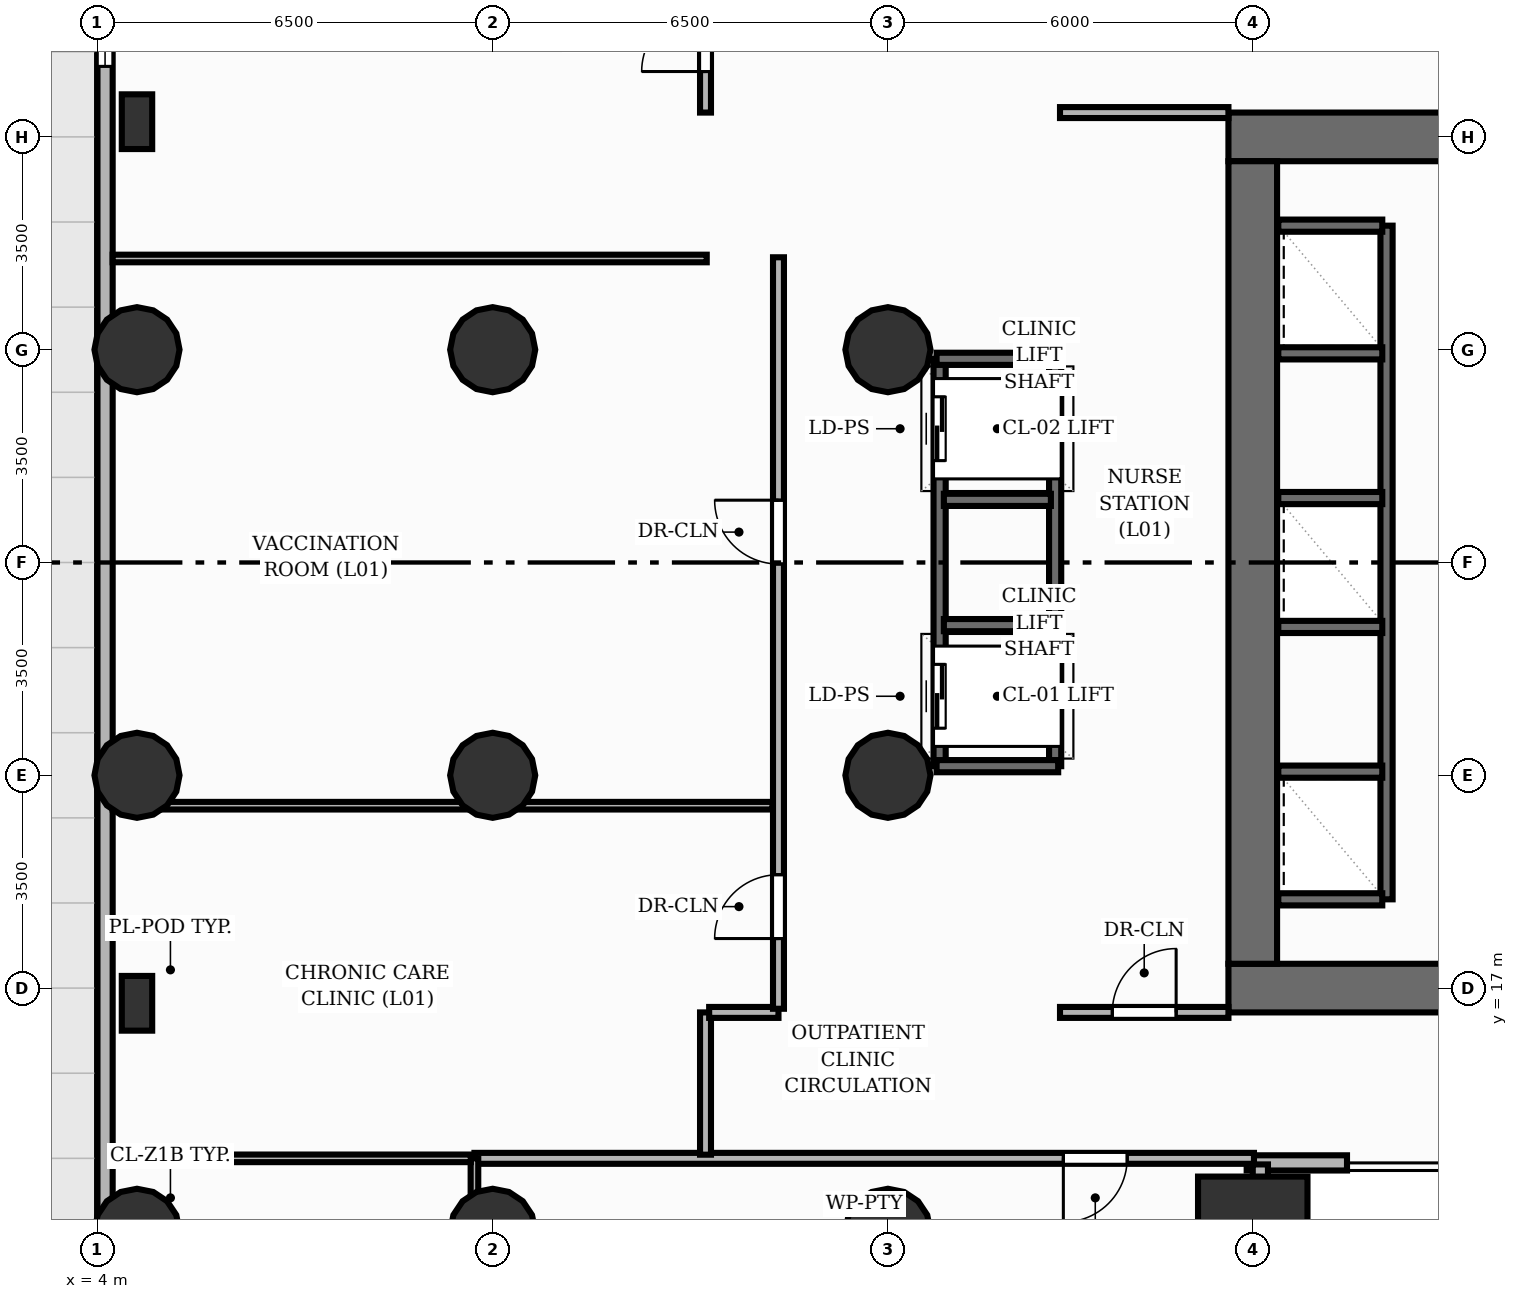
"""IFC4 building model, lengths in metres.
Left out: names, types, materials, properties, quantities, classifications, styles, units other than length and angle.
Written with IfcOpenShell. Run it as: python <this file> out.ifc"""

import sys

from ifc_helpers import new_model, si_unit, direction, frame, frame_2d, origin, origin_2d, place, context, subcontext, project, spatial, rectangle, circle, extrude, element, fill, save


model = new_model("IFC4")
c1 = context("Model", 3, precision=1e-05, world=origin(), true_north=direction((0.0, 1.0)))
c2 = subcontext(c1, "Body", "Model", "MODEL_VIEW")
j1 = project(units=[si_unit("LENGTHUNIT", "METRE"), si_unit("PLANEANGLEUNIT", "RADIAN")], contexts=[c1])
p1 = place(None, origin())
s1 = spatial("IfcSite", under=j1, at=p1, CompositionType="ELEMENT")
p2 = place(p1, origin())
s2 = spatial("IfcBuilding", under=s1, at=p2, CompositionType="ELEMENT")
p3 = place(p2, frame((0.0, 0.0, 4.0)))
s3 = spatial("IfcBuildingStorey", under=s2, at=p3, CompositionType="ELEMENT", Elevation=4.0)
p4 = place(p3, frame((22.6, 17.0, 0.0), z_axis=(0.0, 0.0, 1.0), x_axis=(1.0, 0.0, 0.0)))
e1 = element("IfcWall", 1, at=p4, inside=s3, PredefinedType="SHEAR", context=c2, shape_type="SweptSolid", body=[
    extrude(rectangle(XDim=18.8, YDim=0.8, at=frame_2d((9.4, 0.0))), origin(), (0.0, 0.0, 1.0), 4.0),
])
p5 = place(p4, frame((5.9, 0.0, 0.0)))
e2 = element("IfcOpeningElement", 2, at=p5, cuts=e1, PredefinedType="OPENING", context=c2, shape_type="SweptSolid", body=[
    extrude(rectangle(XDim=1.1, YDim=2.15, at=frame_2d((0.55, 1.075))), frame((0.0, 0.41, 0.0), z_axis=(0.0, -1.0, 0.0), x_axis=(1.0, 0.0, 0.0)), (0.0, 0.0, 1.0), 0.82),
])
p6 = place(p4, frame((9.45, 0.0, 0.0)))
e3 = element("IfcOpeningElement", 3, at=p6, cuts=e1, PredefinedType="OPENING", context=c2, shape_type="SweptSolid", body=[
    extrude(rectangle(XDim=0.9, YDim=2.1, at=frame_2d((0.45, 1.05))), frame((0.0, 0.41, 0.0), z_axis=(0.0, -1.0, 0.0), x_axis=(1.0, 0.0, 0.0)), (0.0, 0.0, 1.0), 0.82),
])
p7 = place(p3, frame((22.6, 31.0, 0.0), z_axis=(0.0, 0.0, 1.0), x_axis=(1.0, 0.0, 0.0)))
e4 = element("IfcWall", 4, at=p7, inside=s3, PredefinedType="SHEAR", context=c2, shape_type="SweptSolid", body=[
    extrude(rectangle(XDim=18.8, YDim=0.8, at=frame_2d((9.4, 0.0))), origin(), (0.0, 0.0, 1.0), 4.0),
])
p8 = place(p7, frame((11.8, 0.0, 0.0)))
e5 = element("IfcOpeningElement", 5, at=p8, cuts=e4, PredefinedType="OPENING", context=c2, shape_type="SweptSolid", body=[
    extrude(rectangle(XDim=1.1, YDim=2.15, at=frame_2d((0.55, 1.075))), frame((0.0, 0.41, 0.0), z_axis=(0.0, -1.0, 0.0), x_axis=(1.0, 0.0, 0.0)), (0.0, 0.0, 1.0), 0.82),
])
p9 = place(p3, frame((23.0, 17.4, 0.0), z_axis=(0.0, 0.0, 1.0), x_axis=(0.0, 1.0, 0.0)))
e6 = element("IfcWall", 6, at=p9, inside=s3, PredefinedType="SHEAR", context=c2, shape_type="SweptSolid", body=[
    extrude(rectangle(XDim=13.2, YDim=0.8, at=frame_2d((6.6, 0.0))), origin(), (0.0, 0.0, 1.0), 4.0),
])
for number, where, z_axis, x_axis in (
    (7, (4.65, 13.0, 0.0), (0.0, 0.0, 1.0), (1.0, 0.0, 0.0)),
    (8, (4.65, 20.5, 0.0), (0.0, 0.0, 1.0), (1.0, 0.0, 0.0)),
    (9, (4.65, 27.5, 0.0), (0.0, 0.0, 1.0), (1.0, 0.0, 0.0)),
    (10, (10.5, 13.0, 0.0), (0.0, 0.0, 1.0), (1.0, 0.0, 0.0)),
    (11, (10.5, 20.5, 0.0), (0.0, 0.0, 1.0), (1.0, 0.0, 0.0)),
    (12, (10.5, 27.5, 0.0), (0.0, 0.0, 1.0), (1.0, 0.0, 0.0)),
    (13, (17.0, 13.0, 0.0), (0.0, 0.0, 1.0), (1.0, 0.0, 0.0)),
    (14, (17.0, 20.5, 0.0), (0.0, 0.0, 1.0), (1.0, 0.0, 0.0)),
    (15, (17.0, 27.5, 0.0), (0.0, 0.0, 1.0), (1.0, 0.0, 0.0)),
):
    element("IfcColumn", number, at=place(p3, frame(where, z_axis=z_axis, x_axis=x_axis)), inside=s3, PredefinedType="COLUMN", context=c2, shape_type="SweptSolid", body=[
        extrude(circle(Radius=0.7, at=origin_2d()), origin(), (0.0, 0.0, 1.0), 4.0),
    ])
p10 = place(p3, frame((23.0, 13.0, 0.0), z_axis=(0.0, 0.0, 1.0), x_axis=(1.0, 0.0, 0.0)))
e16 = element("IfcColumn", 16, at=p10, inside=s3, PredefinedType="COLUMN", context=c2, shape_type="SweptSolid", body=[
    extrude(rectangle(XDim=1.8, YDim=1.8, at=origin_2d()), origin(), (0.0, 0.0, 1.0), 4.0),
])
for number, where, z_axis, x_axis in (
    (17, (4.65, 16.75, 0.0), (0.0, 0.0, 1.0), (1.0, 0.0, 0.0)),
    (18, (4.65, 31.25, 0.0), (0.0, 0.0, 1.0), (1.0, 0.0, 0.0)),
):
    element("IfcColumn", number, at=place(p3, frame(where, z_axis=z_axis, x_axis=x_axis)), inside=s3, PredefinedType="PILASTER", context=c2, shape_type="SweptSolid", body=[
        extrude(rectangle(XDim=0.5, YDim=0.9, at=origin_2d()), origin(), (0.0, 0.0, 1.0), 4.0),
    ])
p11 = place(p3, frame((24.55, 14.125, 0.0), z_axis=(0.0, 0.0, 1.0), x_axis=(-1.0, 0.0, 0.0)))
e19 = element("IfcWall", 19, at=p11, inside=s3, PredefinedType="SOLIDWALL", context=c2, shape_type="SweptSolid", body=[
    extrude(rectangle(XDim=1.65, YDim=0.25, at=frame_2d((0.825, 0.0))), origin(), (0.0, 0.0, 1.0), 3.72),
])
p12 = place(p3, frame((23.125, 3.9, 0.0), z_axis=(0.0, 0.0, 1.0), x_axis=(0.0, 1.0, 0.0)))
e20 = element("IfcWall", 20, at=p12, inside=s3, PredefinedType="SOLIDWALL", context=c2, shape_type="SweptSolid", body=[
    extrude(rectangle(XDim=10.2, YDim=0.25, at=frame_2d((5.1, 0.0))), origin(), (0.0, 0.0, 1.0), 3.178),
])
p13 = place(p12, frame((4.2, 0.0, 0.9)))
e21 = element("IfcOpeningElement", 21, at=p13, cuts=e20, PredefinedType="OPENING", context=c2, shape_type="SweptSolid", body=[
    extrude(rectangle(XDim=1.8, YDim=1.8, at=frame_2d((0.9, 0.9))), frame((0.0, 0.135, 0.0), z_axis=(0.0, -1.0, 0.0), x_axis=(1.0, 0.0, 0.0)), (0.0, 0.0, 1.0), 0.27),
])
p14 = place(p3, frame((4.125, 8.9, 0.0), z_axis=(0.0, 0.0, 1.0), x_axis=(0.0, 1.0, 0.0)))
e22 = element("IfcWall", 22, at=p14, inside=s3, PredefinedType="SOLIDWALL", context=c2, shape_type="SweptSolid", body=[
    extrude(rectangle(XDim=30.2, YDim=0.25, at=frame_2d((15.1, 0.0))), origin(), (0.0, 0.0, 1.0), 3.72),
])
p15 = place(p14, frame((23.26, 0.0, 0.9)))
e23 = element("IfcOpeningElement", 23, at=p15, cuts=e22, PredefinedType="OPENING", context=c2, shape_type="SweptSolid", body=[
    extrude(rectangle(XDim=1.8, YDim=1.8, at=frame_2d((0.9, 0.9))), frame((0.0, 0.135, 0.0), z_axis=(0.0, -1.0, 0.0), x_axis=(1.0, 0.0, 0.0)), (0.0, 0.0, 1.0), 0.27),
])
p16 = place(p3, frame((25.2, 18.46, 0.0), z_axis=(0.0, 0.0, 1.0), x_axis=(0.0, 1.0, 0.0)))
e24 = element("IfcWall", 24, at=p16, inside=s3, PredefinedType="SHEAR", context=c2, shape_type="SweptSolid", body=[
    extrude(rectangle(XDim=11.08, YDim=0.2, at=frame_2d((5.54, 0.0))), origin(), (0.0, 0.0, 1.0), 4.0),
])
for number, where, z_axis, x_axis in (
    (25, (23.42, 18.46, 0.0), (0.0, 0.0, 1.0), (1.0, 0.0, 0.0)),
    (26, (23.42, 29.54, 0.0), (0.0, 0.0, 1.0), (1.0, 0.0, 0.0)),
    (27, (23.42, 20.56, 0.0), (0.0, 0.0, 1.0), (1.0, 0.0, 0.0)),
    (28, (23.42, 22.94, 0.0), (0.0, 0.0, 1.0), (1.0, 0.0, 0.0)),
    (29, (23.42, 25.06, 0.0), (0.0, 0.0, 1.0), (1.0, 0.0, 0.0)),
    (30, (23.42, 27.44, 0.0), (0.0, 0.0, 1.0), (1.0, 0.0, 0.0)),
):
    element("IfcWall", number, at=place(p3, frame(where, z_axis=z_axis, x_axis=x_axis)), inside=s3, PredefinedType="SHEAR", context=c2, shape_type="SweptSolid", body=[
        extrude(rectangle(XDim=1.71, YDim=0.2, at=frame_2d((0.855, 0.0))), origin(), (0.0, 0.0, 1.0), 4.0),
    ])
p17 = place(p3, frame((17.85, 20.65, 0.0), z_axis=(0.0, 0.0, 1.0), x_axis=(0.0, 1.0, 0.0)))
e31 = element("IfcWall", 31, at=p17, inside=s3, PredefinedType="SHEAR", context=c2, shape_type="SweptSolid", body=[
    extrude(rectangle(XDim=6.7, YDim=0.2, at=frame_2d((3.35, 0.0))), origin(), (0.0, 0.0, 1.0), 4.0),
])
p18 = place(p17, frame((0.625, 0.0, 0.0)))
e32 = element("IfcOpeningElement", 32, at=p18, cuts=e31, PredefinedType="OPENING", context=c2, shape_type="SweptSolid", body=[
    extrude(rectangle(XDim=1.05, YDim=2.15, at=frame_2d((0.525, 1.075))), frame((0.0, 0.11, 0.0), z_axis=(0.0, -1.0, 0.0), x_axis=(1.0, 0.0, 0.0)), (0.0, 0.0, 1.0), 0.22),
])
p19 = place(p17, frame((5.025, 0.0, 0.0)))
e33 = element("IfcOpeningElement", 33, at=p19, cuts=e31, PredefinedType="OPENING", context=c2, shape_type="SweptSolid", body=[
    extrude(rectangle(XDim=1.05, YDim=2.15, at=frame_2d((0.525, 1.075))), frame((0.0, 0.11, 0.0), z_axis=(0.0, -1.0, 0.0), x_axis=(1.0, 0.0, 0.0)), (0.0, 0.0, 1.0), 0.22),
])
p20 = place(p3, frame((19.75, 20.65, 0.0), z_axis=(0.0, 0.0, 1.0), x_axis=(0.0, 1.0, 0.0)))
e34 = element("IfcWall", 34, at=p20, inside=s3, PredefinedType="SHEAR", context=c2, shape_type="SweptSolid", body=[
    extrude(rectangle(XDim=6.7, YDim=0.2, at=frame_2d((3.35, 0.0))), origin(), (0.0, 0.0, 1.0), 4.0),
])
for number, where, z_axis, x_axis in (
    (35, (17.8, 20.65, 0.0), (0.0, 0.0, 1.0), (1.0, 0.0, 0.0)),
    (36, (17.8, 27.35, 0.0), (0.0, 0.0, 1.0), (1.0, 0.0, 0.0)),
):
    element("IfcWall", number, at=place(p3, frame(where, z_axis=z_axis, x_axis=x_axis)), inside=s3, PredefinedType="SHEAR", context=c2, shape_type="SweptSolid", body=[
        extrude(rectangle(XDim=2.0, YDim=0.2, at=frame_2d((1.0, 0.0))), origin(), (0.0, 0.0, 1.0), 4.0),
    ])
for number, where, z_axis, x_axis in (
    (37, (17.92, 22.97, 0.0), (0.0, 0.0, 1.0), (1.0, 0.0, 0.0)),
    (38, (17.92, 25.03, 0.0), (0.0, 0.0, 1.0), (1.0, 0.0, 0.0)),
):
    element("IfcWall", number, at=place(p3, frame(where, z_axis=z_axis, x_axis=x_axis)), inside=s3, PredefinedType="SHEAR", context=c2, shape_type="SweptSolid", body=[
        extrude(rectangle(XDim=1.76, YDim=0.2, at=frame_2d((0.88, 0.0))), origin(), (0.0, 0.0, 1.0), 4.0),
    ])
p21 = place(p3, frame((23.02, 14.2, 0.0), z_axis=(0.0, 0.0, 1.0), x_axis=(-1.0, 0.0, 0.0)))
e39 = element("IfcWall", 39, at=p21, inside=s3, PredefinedType="PARTITIONING", context=c2, shape_type="SweptSolid", body=[
    extrude(rectangle(XDim=12.82, YDim=0.18, at=frame_2d((6.41, 0.0))), origin(), (0.0, 0.0, 1.0), 3.715),
])
p22 = place(p21, frame((2.085, 0.0, 0.0)))
e40 = element("IfcOpeningElement", 40, at=p22, cuts=e39, PredefinedType="OPENING", context=c2, shape_type="SweptSolid", body=[
    extrude(rectangle(XDim=1.05, YDim=2.15, at=frame_2d((0.525, 1.075))), frame((0.0, 0.1, 0.0), z_axis=(0.0, -1.0, 0.0), x_axis=(1.0, 0.0, 0.0)), (0.0, 0.0, 1.0), 0.2),
])
p23 = place(p3, frame((14.0, 14.26, 0.0), z_axis=(0.0, 0.0, 1.0), x_axis=(0.0, 1.0, 0.0)))
e41 = element("IfcWall", 41, at=p23, inside=s3, PredefinedType="PARTITIONING", context=c2, shape_type="SweptSolid", body=[
    extrude(rectangle(XDim=2.34, YDim=0.18, at=frame_2d((1.17, 0.0))), origin(), (0.0, 0.0, 1.0), 3.715),
])
p24 = place(p3, frame((14.06, 16.6, 0.0), z_axis=(0.0, 0.0, 1.0), x_axis=(1.0, 0.0, 0.0)))
e42 = element("IfcWall", 42, at=p24, inside=s3, PredefinedType="PARTITIONING", context=c2, shape_type="SweptSolid", body=[
    extrude(rectangle(XDim=1.14, YDim=0.18, at=frame_2d((0.57, 0.0))), origin(), (0.0, 0.0, 1.0), 3.715),
])
p25 = place(p3, frame((15.2, 16.66, 0.0), z_axis=(0.0, 0.0, 1.0), x_axis=(0.0, 1.0, 0.0)))
e43 = element("IfcWall", 43, at=p25, inside=s3, PredefinedType="PARTITIONING", context=c2, shape_type="SweptSolid", body=[
    extrude(rectangle(XDim=12.36, YDim=0.18, at=frame_2d((6.18, 0.0))), origin(), (0.0, 0.0, 1.0), 3.715),
])
p26 = place(p25, frame((1.155, 0.0, 0.0)))
e44 = element("IfcOpeningElement", 44, at=p26, cuts=e43, PredefinedType="OPENING", context=c2, shape_type="SweptSolid", body=[
    extrude(rectangle(XDim=1.05, YDim=2.15, at=frame_2d((0.525, 1.075))), frame((0.0, 0.1, 0.0), z_axis=(0.0, -1.0, 0.0), x_axis=(1.0, 0.0, 0.0)), (0.0, 0.0, 1.0), 0.2),
])
p27 = place(p25, frame((7.315, 0.0, 0.0)))
e45 = element("IfcOpeningElement", 45, at=p27, cuts=e43, PredefinedType="OPENING", context=c2, shape_type="SweptSolid", body=[
    extrude(rectangle(XDim=1.05, YDim=2.15, at=frame_2d((0.525, 1.075))), frame((0.0, 0.1, 0.0), z_axis=(0.0, -1.0, 0.0), x_axis=(1.0, 0.0, 0.0)), (0.0, 0.0, 1.0), 0.2),
])
p28 = place(p3, frame((14.0, 31.4, 0.0), z_axis=(0.0, 0.0, 1.0), x_axis=(0.0, 1.0, 0.0)))
e46 = element("IfcWall", 46, at=p28, inside=s3, PredefinedType="PARTITIONING", context=c2, shape_type="SweptSolid", body=[
    extrude(rectangle(XDim=12.35, YDim=0.18, at=frame_2d((6.175, 0.0))), origin(), (0.0, 0.0, 1.0), 3.715),
])
p29 = place(p28, frame((0.675, 0.0, 0.0)))
e47 = element("IfcOpeningElement", 47, at=p29, cuts=e46, PredefinedType="OPENING", context=c2, shape_type="SweptSolid", body=[
    extrude(rectangle(XDim=1.05, YDim=2.15, at=frame_2d((0.525, 1.075))), frame((0.0, 0.1, 0.0), z_axis=(0.0, -1.0, 0.0), x_axis=(1.0, 0.0, 0.0)), (0.0, 0.0, 1.0), 0.2),
])
p30 = place(p28, frame((6.925, 0.0, 0.0)))
e48 = element("IfcOpeningElement", 48, at=p30, cuts=e46, PredefinedType="OPENING", context=c2, shape_type="SweptSolid", body=[
    extrude(rectangle(XDim=0.9, YDim=2.1, at=frame_2d((0.45, 1.05))), frame((0.0, 0.1, 0.0), z_axis=(0.0, -1.0, 0.0), x_axis=(1.0, 0.0, 0.0)), (0.0, 0.0, 1.0), 0.2),
])
p31 = place(p3, frame((19.83, 16.6, 0.0), z_axis=(0.0, 0.0, 1.0), x_axis=(1.0, 0.0, 0.0)))
e49 = element("IfcWall", 49, at=p31, inside=s3, PredefinedType="PARTITIONING", context=c2, shape_type="SweptSolid", body=[
    extrude(rectangle(XDim=2.77, YDim=0.18, at=frame_2d((1.385, 0.0))), origin(), (0.0, 0.0, 1.0), 3.715),
])
p32 = place(p31, frame((0.86, 0.0, 0.0)))
e50 = element("IfcOpeningElement", 50, at=p32, cuts=e49, PredefinedType="OPENING", context=c2, shape_type="SweptSolid", body=[
    extrude(rectangle(XDim=1.05, YDim=2.15, at=frame_2d((0.525, 1.075))), frame((0.0, 0.1, 0.0), z_axis=(0.0, -1.0, 0.0), x_axis=(1.0, 0.0, 0.0)), (0.0, 0.0, 1.0), 0.2),
])
p33 = place(p3, frame((22.6, 31.4, 0.0), z_axis=(0.0, 0.0, 1.0), x_axis=(-1.0, 0.0, 0.0)))
e51 = element("IfcWall", 51, at=p33, inside=s3, PredefinedType="PARTITIONING", context=c2, shape_type="SweptSolid", body=[
    extrude(rectangle(XDim=2.77, YDim=0.18, at=frame_2d((1.385, 0.0))), origin(), (0.0, 0.0, 1.0), 3.715),
])
p34 = place(p3, frame((10.2, 14.2, 0.0), z_axis=(0.0, 0.0, 1.0), x_axis=(0.0, -1.0, 0.0)))
e52 = element("IfcWall", 52, at=p34, inside=s3, PredefinedType="PARTITIONING", context=c2, shape_type="SweptSolid", body=[
    extrude(rectangle(XDim=9.95, YDim=0.125, at=frame_2d((4.975, 0.0))), origin(), (0.0, 0.0, 1.0), 3.715),
])
p35 = place(p34, frame((4.45, 0.0, 0.0)))
e53 = element("IfcOpeningElement", 53, at=p35, cuts=e52, PredefinedType="OPENING", context=c2, shape_type="SweptSolid", body=[
    extrude(rectangle(XDim=1.05, YDim=2.15, at=frame_2d((0.525, 1.075))), frame((0.0, 0.073, 0.0), z_axis=(0.0, -1.0, 0.0), x_axis=(1.0, 0.0, 0.0)), (0.0, 0.0, 1.0), 0.145),
])
p36 = place(p3, frame((4.25, 14.2, 0.0), z_axis=(0.0, 0.0, 1.0), x_axis=(1.0, 0.0, 0.0)))
e54 = element("IfcWall", 54, at=p36, inside=s3, PredefinedType="PARTITIONING", context=c2, shape_type="SweptSolid", body=[
    extrude(rectangle(XDim=5.89, YDim=0.125, at=frame_2d((2.945, 0.0))), origin(), (0.0, 0.0, 1.0), 3.715),
])
p37 = place(p3, frame((4.25, 20.0, 0.0), z_axis=(0.0, 0.0, 1.0), x_axis=(1.0, 0.0, 0.0)))
e55 = element("IfcWall", 55, at=p37, inside=s3, PredefinedType="PARTITIONING", context=c2, shape_type="SweptSolid", body=[
    extrude(rectangle(XDim=10.85, YDim=0.125, at=frame_2d((5.425, 0.0))), origin(), (0.0, 0.0, 1.0), 3.715),
])
p38 = place(p3, frame((4.25, 29.0, 0.0), z_axis=(0.0, 0.0, 1.0), x_axis=(1.0, 0.0, 0.0)))
e56 = element("IfcWall", 56, at=p38, inside=s3, PredefinedType="PARTITIONING", context=c2, shape_type="SweptSolid", body=[
    extrude(rectangle(XDim=9.77, YDim=0.125, at=frame_2d((4.885, 0.0))), origin(), (0.0, 0.0, 1.0), 3.715),
])
p39 = place(p15, origin())
e57 = element("IfcWindow", 57, at=p39, inside=s3, PartitioningType="SINGLE_PANEL", PredefinedType="WINDOW", context=c2, shape_type="SweptSolid", body=[
    extrude(rectangle(XDim=1.8, YDim=1.8, at=frame_2d((0.9, 0.9))), frame((0.0, 0.03, 0.0), z_axis=(0.0, -1.0, 0.0), x_axis=(1.0, 0.0, 0.0)), (0.0, 0.0, 1.0), 0.06),
])
fill(e23, e57)
p40 = place(p18, origin())
e58 = element("IfcDoor", 58, at=p40, inside=s3, OperationType="DOUBLE_DOOR_SLIDING", PredefinedType="DOOR", context=c2, shape_type="SweptSolid", body=[
    extrude(rectangle(XDim=1.05, YDim=2.15, at=frame_2d((0.525, 1.075))), frame((0.0, 0.025, 0.0), z_axis=(0.0, -1.0, 0.0), x_axis=(1.0, 0.0, 0.0)), (0.0, 0.0, 1.0), 0.05),
])
fill(e32, e58)
p41 = place(p19, origin())
e59 = element("IfcDoor", 59, at=p41, inside=s3, OperationType="DOUBLE_DOOR_SLIDING", PredefinedType="DOOR", context=c2, shape_type="SweptSolid", body=[
    extrude(rectangle(XDim=1.05, YDim=2.15, at=frame_2d((0.525, 1.075))), frame((0.0, 0.025, 0.0), z_axis=(0.0, -1.0, 0.0), x_axis=(1.0, 0.0, 0.0)), (0.0, 0.0, 1.0), 0.05),
])
fill(e33, e59)
p42 = place(p22, origin())
e60 = element("IfcDoor", 60, at=p42, inside=s3, OperationType="SINGLE_SWING_RIGHT", PredefinedType="DOOR", context=c2, shape_type="SweptSolid", body=[
    extrude(rectangle(XDim=1.05, YDim=2.15, at=frame_2d((0.525, 1.075))), frame((0.0, 0.025, 0.0), z_axis=(0.0, -1.0, 0.0), x_axis=(1.0, 0.0, 0.0)), (0.0, 0.0, 1.0), 0.05),
])
fill(e40, e60)
p43 = place(p26, origin())
e61 = element("IfcDoor", 61, at=p43, inside=s3, OperationType="SINGLE_SWING_LEFT", PredefinedType="DOOR", context=c2, shape_type="SweptSolid", body=[
    extrude(rectangle(XDim=1.05, YDim=2.15, at=frame_2d((0.525, 1.075))), frame((0.0, 0.025, 0.0), z_axis=(0.0, -1.0, 0.0), x_axis=(1.0, 0.0, 0.0)), (0.0, 0.0, 1.0), 0.05),
])
fill(e44, e61)
p44 = place(p27, origin())
e62 = element("IfcDoor", 62, at=p44, inside=s3, OperationType="SINGLE_SWING_RIGHT", PredefinedType="DOOR", context=c2, shape_type="SweptSolid", body=[
    extrude(rectangle(XDim=1.05, YDim=2.15, at=frame_2d((0.525, 1.075))), frame((0.0, 0.025, 0.0), z_axis=(0.0, -1.0, 0.0), x_axis=(1.0, 0.0, 0.0)), (0.0, 0.0, 1.0), 0.05),
])
fill(e45, e62)
p45 = place(p29, origin())
e63 = element("IfcDoor", 63, at=p45, inside=s3, OperationType="SINGLE_SWING_LEFT", PredefinedType="DOOR", context=c2, shape_type="SweptSolid", body=[
    extrude(rectangle(XDim=1.05, YDim=2.15, at=frame_2d((0.525, 1.075))), frame((0.0, 0.025, 0.0), z_axis=(0.0, -1.0, 0.0), x_axis=(1.0, 0.0, 0.0)), (0.0, 0.0, 1.0), 0.05),
])
fill(e47, e63)
p46 = place(p32, origin())
e64 = element("IfcDoor", 64, at=p46, inside=s3, OperationType="SINGLE_SWING_RIGHT", PredefinedType="DOOR", context=c2, shape_type="SweptSolid", body=[
    extrude(rectangle(XDim=1.05, YDim=2.15, at=frame_2d((0.525, 1.075))), frame((0.0, 0.025, 0.0), z_axis=(0.0, -1.0, 0.0), x_axis=(1.0, 0.0, 0.0)), (0.0, 0.0, 1.0), 0.05),
])
fill(e50, e64)
save(model, sys.argv[1])
